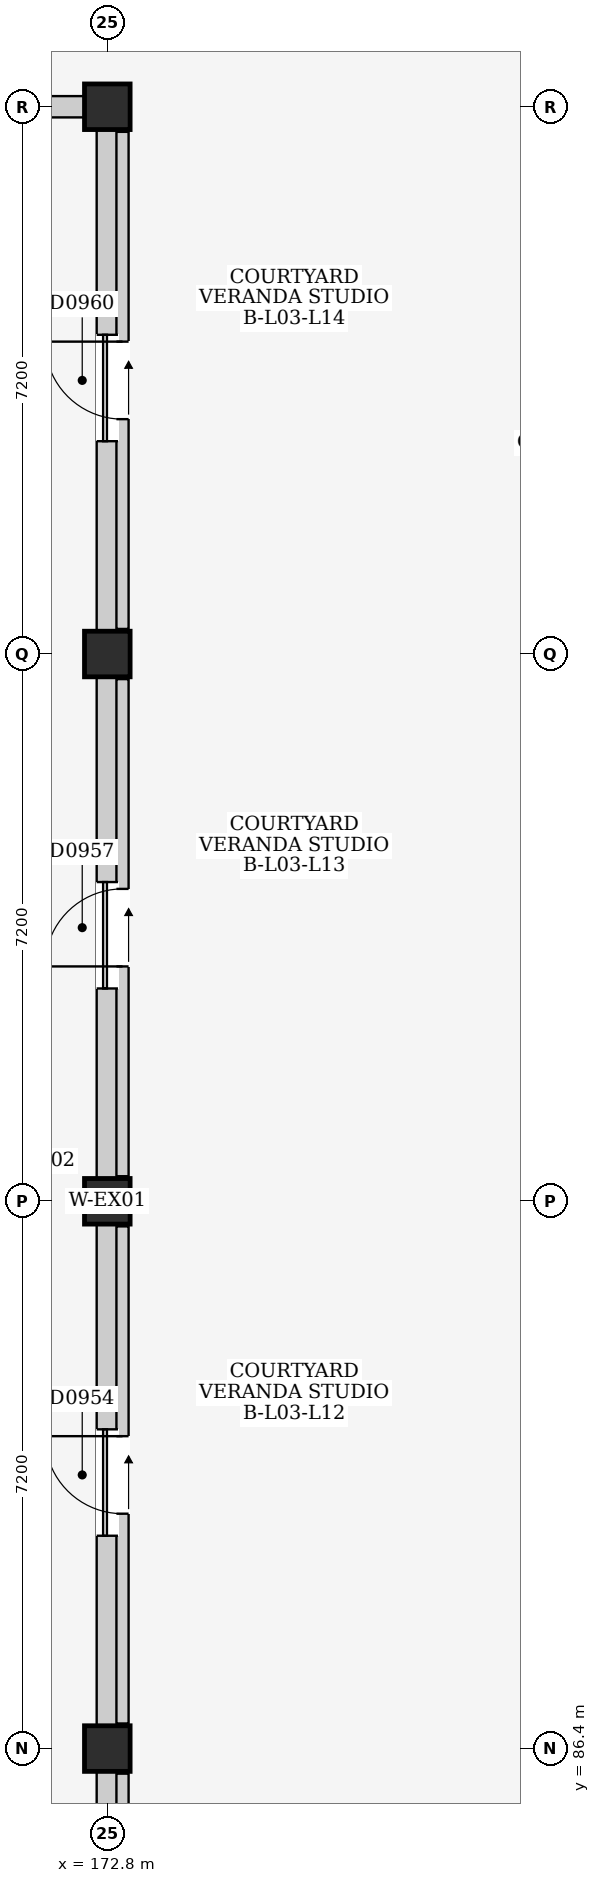
"""IFC4 building model, lengths in metres.
Left out: names, types, materials, properties, quantities, classifications, styles, units other than length and angle.
Written with IfcOpenShell. Run it as: python <this file> out.ifc"""

import sys

from ifc_helpers import new_model, si_unit, direction, frame, frame_2d, origin, origin_2d, place, context, subcontext, project, spatial, rectangle, extrude, element, fill, save


model = new_model("IFC4")
c1 = context("Model", 3, precision=1e-05, world=origin(), true_north=direction((0.0, 1.0)))
c2 = subcontext(c1, "Body", "Model", "MODEL_VIEW")
j1 = project(units=[si_unit("LENGTHUNIT", "METRE"), si_unit("PLANEANGLEUNIT", "RADIAN")], contexts=[c1])
p1 = place(None, origin())
s1 = spatial("IfcSite", under=j1, at=p1, CompositionType="ELEMENT")
p2 = place(p1, origin())
s2 = spatial("IfcBuilding", under=s1, at=p2, CompositionType="ELEMENT")
p3 = place(p2, frame((0.0, 0.0, 12.2)))
s3 = spatial("IfcBuildingStorey", under=s2, at=p3, CompositionType="ELEMENT", Elevation=12.2)
for number, where, z_axis, x_axis in (
    (1, (172.8, 86.4, 0.0), (0.0, 0.0, 1.0), (1.0, 0.0, 0.0)),
    (2, (172.8, 93.6, 0.0), (0.0, 0.0, 1.0), (1.0, 0.0, 0.0)),
    (3, (172.8, 100.8, 0.0), (0.0, 0.0, 1.0), (1.0, 0.0, 0.0)),
    (4, (172.8, 108.0, 0.0), (0.0, 0.0, 1.0), (1.0, 0.0, 0.0)),
):
    element("IfcColumn", number, at=place(p3, frame(where, z_axis=z_axis, x_axis=x_axis)), inside=s3, PredefinedType="COLUMN", context=c2, shape_type="SweptSolid", body=[
        extrude(rectangle(XDim=0.6, YDim=0.6, at=origin_2d()), origin(), (0.0, 0.0, 1.0), 3.2),
    ])
p4 = place(p3, frame((165.9, 108.0, 0.0), z_axis=(0.0, 0.0, 1.0), x_axis=(1.0, 0.0, 0.0)))
e5 = element("IfcWall", 5, at=p4, inside=s3, PredefinedType="ELEMENTEDWALL", context=c2, shape_type="SweptSolid", body=[
    extrude(rectangle(XDim=6.6, YDim=0.28, at=frame_2d((3.3, 0.0))), origin(), (0.0, 0.0, 1.0), 2.365),
])
p5 = place(p4, frame((2.8, 0.0, 1.2)))
e6 = element("IfcOpeningElement", 6, at=p5, cuts=e5, PredefinedType="OPENING", context=c2, shape_type="SweptSolid", body=[
    extrude(rectangle(XDim=1.0, YDim=0.9, at=frame_2d((0.5, 0.45))), frame((0.0, 0.155, 0.0), z_axis=(0.0, -1.0, 0.0), x_axis=(1.0, 0.0, 0.0)), (0.0, 0.0, 1.0), 0.31),
])
p6 = place(p3, frame((172.8, 79.5, 0.0), z_axis=(0.0, 0.0, 1.0), x_axis=(0.0, 1.0, 0.0)))
e7 = element("IfcWall", 7, at=p6, inside=s3, PredefinedType="ELEMENTEDWALL", context=c2, shape_type="SweptSolid", body=[
    extrude(rectangle(XDim=6.6, YDim=0.28, at=frame_2d((3.3, 0.0))), origin(), (0.0, 0.0, 1.0), 2.415),
])
p7 = place(p6, frame((2.5, 0.0, 0.0)))
e8 = element("IfcOpeningElement", 8, at=p7, cuts=e7, PredefinedType="OPENING", context=c2, shape_type="SweptSolid", body=[
    extrude(rectangle(XDim=1.4, YDim=2.1, at=frame_2d((0.7, 1.05))), frame((0.0, 0.155, 0.0), z_axis=(0.0, -1.0, 0.0), x_axis=(1.0, 0.0, 0.0)), (0.0, 0.0, 1.0), 0.31),
])
p8 = place(p3, frame((172.8, 86.7, 0.0), z_axis=(0.0, 0.0, 1.0), x_axis=(0.0, 1.0, 0.0)))
e9 = element("IfcWall", 9, at=p8, inside=s3, PredefinedType="ELEMENTEDWALL", context=c2, shape_type="SweptSolid", body=[
    extrude(rectangle(XDim=6.6, YDim=0.28, at=frame_2d((3.3, 0.0))), origin(), (0.0, 0.0, 1.0), 2.415),
])
p9 = place(p8, frame((2.5, 0.0, 0.0)))
e10 = element("IfcOpeningElement", 10, at=p9, cuts=e9, PredefinedType="OPENING", context=c2, shape_type="SweptSolid", body=[
    extrude(rectangle(XDim=1.4, YDim=2.1, at=frame_2d((0.7, 1.05))), frame((0.0, 0.155, 0.0), z_axis=(0.0, -1.0, 0.0), x_axis=(1.0, 0.0, 0.0)), (0.0, 0.0, 1.0), 0.31),
])
p10 = place(p3, frame((172.8, 93.9, 0.0), z_axis=(0.0, 0.0, 1.0), x_axis=(0.0, 1.0, 0.0)))
e11 = element("IfcWall", 11, at=p10, inside=s3, PredefinedType="ELEMENTEDWALL", context=c2, shape_type="SweptSolid", body=[
    extrude(rectangle(XDim=6.6, YDim=0.28, at=frame_2d((3.3, 0.0))), origin(), (0.0, 0.0, 1.0), 2.415),
])
p11 = place(p10, frame((2.5, 0.0, 0.0)))
e12 = element("IfcOpeningElement", 12, at=p11, cuts=e11, PredefinedType="OPENING", context=c2, shape_type="SweptSolid", body=[
    extrude(rectangle(XDim=1.4, YDim=2.1, at=frame_2d((0.7, 1.05))), frame((0.0, 0.155, 0.0), z_axis=(0.0, -1.0, 0.0), x_axis=(1.0, 0.0, 0.0)), (0.0, 0.0, 1.0), 0.31),
])
p12 = place(p3, frame((172.8, 101.1, 0.0), z_axis=(0.0, 0.0, 1.0), x_axis=(0.0, 1.0, 0.0)))
e13 = element("IfcWall", 13, at=p12, inside=s3, PredefinedType="ELEMENTEDWALL", context=c2, shape_type="SweptSolid", body=[
    extrude(rectangle(XDim=6.6, YDim=0.28, at=frame_2d((3.3, 0.0))), origin(), (0.0, 0.0, 1.0), 2.415),
])
p13 = place(p12, frame((2.5, 0.0, 0.0)))
e14 = element("IfcOpeningElement", 14, at=p13, cuts=e13, PredefinedType="OPENING", context=c2, shape_type="SweptSolid", body=[
    extrude(rectangle(XDim=1.4, YDim=2.1, at=frame_2d((0.7, 1.05))), frame((0.0, 0.155, 0.0), z_axis=(0.0, -1.0, 0.0), x_axis=(1.0, 0.0, 0.0)), (0.0, 0.0, 1.0), 0.31),
])
p14 = place(p3, frame((173.0, 79.53, 0.0), z_axis=(0.0, 0.0, 1.0), x_axis=(0.0, 1.0, 0.0)))
e15 = element("IfcWall", 15, at=p14, inside=s3, PredefinedType="PARTITIONING", context=c2, shape_type="SweptSolid", body=[
    extrude(rectangle(XDim=6.54, YDim=0.16, at=frame_2d((3.27, 0.0))), origin(), (0.0, 0.0, 1.0), 2.415),
])
p15 = place(p14, frame((2.76, 0.0, 0.0)))
e16 = element("IfcOpeningElement", 16, at=p15, cuts=e15, PredefinedType="OPENING", context=c2, shape_type="SweptSolid", body=[
    extrude(rectangle(XDim=1.02, YDim=2.18, at=frame_2d((0.51, 1.09))), frame((0.0, 0.095, 0.0), z_axis=(0.0, -1.0, 0.0), x_axis=(1.0, 0.0, 0.0)), (0.0, 0.0, 1.0), 0.19),
])
p16 = place(p3, frame((173.0, 86.73, 0.0), z_axis=(0.0, 0.0, 1.0), x_axis=(0.0, 1.0, 0.0)))
e17 = element("IfcWall", 17, at=p16, inside=s3, PredefinedType="PARTITIONING", context=c2, shape_type="SweptSolid", body=[
    extrude(rectangle(XDim=6.54, YDim=0.16, at=frame_2d((3.27, 0.0))), origin(), (0.0, 0.0, 1.0), 2.415),
])
p17 = place(p16, frame((2.76, 0.0, 0.0)))
e18 = element("IfcOpeningElement", 18, at=p17, cuts=e17, PredefinedType="OPENING", context=c2, shape_type="SweptSolid", body=[
    extrude(rectangle(XDim=1.02, YDim=2.18, at=frame_2d((0.51, 1.09))), frame((0.0, 0.095, 0.0), z_axis=(0.0, -1.0, 0.0), x_axis=(1.0, 0.0, 0.0)), (0.0, 0.0, 1.0), 0.19),
])
p18 = place(p3, frame((173.0, 93.93, 0.0), z_axis=(0.0, 0.0, 1.0), x_axis=(0.0, 1.0, 0.0)))
e19 = element("IfcWall", 19, at=p18, inside=s3, PredefinedType="PARTITIONING", context=c2, shape_type="SweptSolid", body=[
    extrude(rectangle(XDim=6.54, YDim=0.16, at=frame_2d((3.27, 0.0))), origin(), (0.0, 0.0, 1.0), 2.415),
])
p19 = place(p18, frame((2.76, 0.0, 0.0)))
e20 = element("IfcOpeningElement", 20, at=p19, cuts=e19, PredefinedType="OPENING", context=c2, shape_type="SweptSolid", body=[
    extrude(rectangle(XDim=1.02, YDim=2.18, at=frame_2d((0.51, 1.09))), frame((0.0, 0.095, 0.0), z_axis=(0.0, -1.0, 0.0), x_axis=(1.0, 0.0, 0.0)), (0.0, 0.0, 1.0), 0.19),
])
p20 = place(p3, frame((173.0, 101.13, 0.0), z_axis=(0.0, 0.0, 1.0), x_axis=(0.0, 1.0, 0.0)))
e21 = element("IfcWall", 21, at=p20, inside=s3, PredefinedType="PARTITIONING", context=c2, shape_type="SweptSolid", body=[
    extrude(rectangle(XDim=6.54, YDim=0.16, at=frame_2d((3.27, 0.0))), origin(), (0.0, 0.0, 1.0), 2.415),
])
p21 = place(p20, frame((2.76, 0.0, 0.0)))
e22 = element("IfcOpeningElement", 22, at=p21, cuts=e21, PredefinedType="OPENING", context=c2, shape_type="SweptSolid", body=[
    extrude(rectangle(XDim=1.02, YDim=2.18, at=frame_2d((0.51, 1.09))), frame((0.0, 0.095, 0.0), z_axis=(0.0, -1.0, 0.0), x_axis=(1.0, 0.0, 0.0)), (0.0, 0.0, 1.0), 0.19),
])
p22 = place(p9, frame((1.4, 0.0, 0.0), z_axis=(0.0, 0.0, 1.0), x_axis=(-1.0, 0.0, 0.0)))
e23 = element("IfcDoor", 23, at=p22, inside=s3, OperationType="SLIDING_TO_RIGHT", PredefinedType="DOOR", context=c2, shape_type="SweptSolid", body=[
    extrude(rectangle(XDim=1.4, YDim=2.1, at=frame_2d((0.7, 1.05))), frame((0.0, 0.025, 0.0), z_axis=(0.0, -1.0, 0.0), x_axis=(1.0, 0.0, 0.0)), (0.0, 0.0, 1.0), 0.05),
])
fill(e10, e23)
p23 = place(p11, frame((1.4, 0.0, 0.0), z_axis=(0.0, 0.0, 1.0), x_axis=(-1.0, 0.0, 0.0)))
e24 = element("IfcDoor", 24, at=p23, inside=s3, OperationType="SLIDING_TO_RIGHT", PredefinedType="DOOR", context=c2, shape_type="SweptSolid", body=[
    extrude(rectangle(XDim=1.4, YDim=2.1, at=frame_2d((0.7, 1.05))), frame((0.0, 0.025, 0.0), z_axis=(0.0, -1.0, 0.0), x_axis=(1.0, 0.0, 0.0)), (0.0, 0.0, 1.0), 0.05),
])
fill(e12, e24)
p24 = place(p13, frame((1.4, 0.0, 0.0), z_axis=(0.0, 0.0, 1.0), x_axis=(-1.0, 0.0, 0.0)))
e25 = element("IfcDoor", 25, at=p24, inside=s3, OperationType="SLIDING_TO_RIGHT", PredefinedType="DOOR", context=c2, shape_type="SweptSolid", body=[
    extrude(rectangle(XDim=1.4, YDim=2.1, at=frame_2d((0.7, 1.05))), frame((0.0, 0.025, 0.0), z_axis=(0.0, -1.0, 0.0), x_axis=(1.0, 0.0, 0.0)), (0.0, 0.0, 1.0), 0.05),
])
fill(e14, e25)
p25 = place(p17, origin())
e26 = element("IfcDoor", 26, at=p25, inside=s3, OperationType="SINGLE_SWING_RIGHT", PredefinedType="DOOR", context=c2, shape_type="SweptSolid", body=[
    extrude(rectangle(XDim=1.02, YDim=2.18, at=frame_2d((0.51, 1.09))), frame((0.0, 0.025, 0.0), z_axis=(0.0, -1.0, 0.0), x_axis=(1.0, 0.0, 0.0)), (0.0, 0.0, 1.0), 0.05),
])
fill(e18, e26)
p26 = place(p19, origin())
e27 = element("IfcDoor", 27, at=p26, inside=s3, OperationType="SINGLE_SWING_LEFT", PredefinedType="DOOR", context=c2, shape_type="SweptSolid", body=[
    extrude(rectangle(XDim=1.02, YDim=2.18, at=frame_2d((0.51, 1.09))), frame((0.0, 0.025, 0.0), z_axis=(0.0, -1.0, 0.0), x_axis=(1.0, 0.0, 0.0)), (0.0, 0.0, 1.0), 0.05),
])
fill(e20, e27)
p27 = place(p21, origin())
e28 = element("IfcDoor", 28, at=p27, inside=s3, OperationType="SINGLE_SWING_RIGHT", PredefinedType="DOOR", context=c2, shape_type="SweptSolid", body=[
    extrude(rectangle(XDim=1.02, YDim=2.18, at=frame_2d((0.51, 1.09))), frame((0.0, 0.025, 0.0), z_axis=(0.0, -1.0, 0.0), x_axis=(1.0, 0.0, 0.0)), (0.0, 0.0, 1.0), 0.05),
])
fill(e22, e28)
save(model, sys.argv[1])
